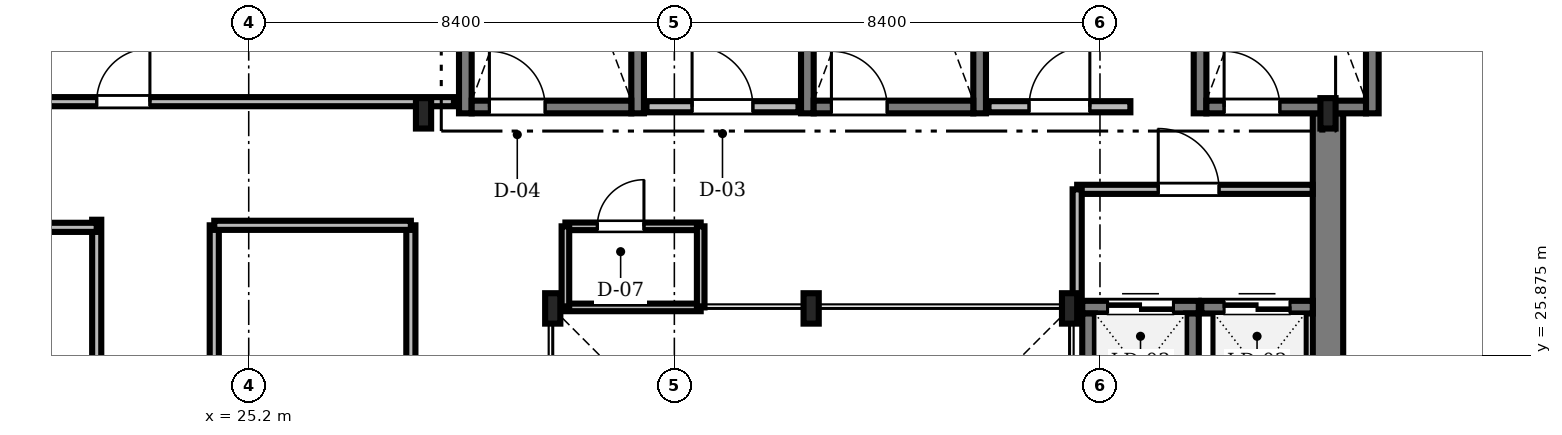
"""IFC4 building model, lengths in metres.
Left out: names, types, materials, properties, quantities, classifications, styles, units other than length and angle.
Written with IfcOpenShell. Run it as: python <this file> out.ifc"""

import sys

from ifc_helpers import new_model, si_unit, direction, frame, frame_2d, origin, origin_2d, place, context, subcontext, project, spatial, rectangle, i_section, extrude, source, transform, mapped, element, fill, save


model = new_model("IFC4")
c1 = context("Model", 3, precision=1e-05, world=origin(), true_north=direction((0.0, 1.0)))
c2 = subcontext(c1, "Body", "Model", "MODEL_VIEW")
j1 = project(units=[si_unit("LENGTHUNIT", "METRE"), si_unit("PLANEANGLEUNIT", "RADIAN")], contexts=[c1])
p1 = place(None, origin())
s1 = spatial("IfcSite", under=j1, at=p1, CompositionType="ELEMENT")
p2 = place(p1, origin())
s2 = spatial("IfcBuilding", under=s1, at=p2, CompositionType="ELEMENT")
p3 = place(p2, frame((0.0, 0.0, 250.6)))
s3 = spatial("IfcBuildingStorey", under=s2, at=p3, CompositionType="ELEMENT", Elevation=250.6)
m1 = source(origin(), c2, "Body", "SweptSolid", [
    extrude(rectangle(XDim=13.15, YDim=0.6, at=frame_2d((6.575, 0.0))), origin(), (0.0, 0.0, 1.0), 3.65),
])
p4 = place(p3, frame((46.5, 17.5, 0.0), z_axis=(0.0, 0.0, 1.0), x_axis=(0.0, 1.0, 0.0)))
e1 = element("IfcWall", 1, at=p4, inside=s3, PredefinedType="SHEAR", context=c2, shape_type="MappedRepresentation", body=[
    mapped(m1, transform((0.0, 0.0, 0.0), scale=1.0)),
])
m2 = source(origin(), c2, "Body", "SweptSolid", [
    extrude(i_section(OverallWidth=0.3, OverallDepth=0.6, WebThickness=0.015, FlangeThickness=0.03, FilletRadius=0.027, at=origin_2d()), origin(), (0.0, 0.0, 1.0), 3.65),
])
for number, where, z_axis, x_axis in (
    (2, (41.4, 26.8, 0.0), (0.0, 0.0, 1.0), (1.0, 0.0, 0.0)),
    (3, (36.3, 26.8, 0.0), (0.0, 0.0, 1.0), (1.0, 0.0, 0.0)),
    (4, (31.2, 26.8, 0.0), (0.0, 0.0, 1.0), (1.0, 0.0, 0.0)),
    (5, (28.65, 30.65, 0.0), (0.0, 0.0, 1.0), (1.0, 0.0, 0.0)),
    (6, (46.5, 30.65, 0.0), (0.0, 0.0, 1.0), (1.0, 0.0, 0.0)),
):
    element("IfcColumn", number, at=place(p3, frame(where, z_axis=z_axis, x_axis=x_axis)), inside=s3, PredefinedType="COLUMN", context=c2, shape_type="MappedRepresentation", body=[
        mapped(m2, transform((0.0, 0.0, 0.0), scale=1.0)),
    ])
m3 = source(origin(), c2, "Body", "SweptSolid", [
    extrude(rectangle(XDim=9.35, YDim=0.25, at=frame_2d((4.675, 0.0))), origin(), (0.0, 0.0, 1.0), 3.75),
])
for number, where, z_axis, x_axis in (
    (7, (29.475, 30.65, 0.0), (0.0, 0.0, 1.0), (0.0, 1.0, 0.0)),
    (8, (32.875, 30.65, 0.0), (0.0, 0.0, 1.0), (0.0, 1.0, 0.0)),
):
    element("IfcWall", number, at=place(p3, frame(where, z_axis=z_axis, x_axis=x_axis)), inside=s3, PredefinedType="SOLIDWALL", context=c2, shape_type="MappedRepresentation", body=[
        mapped(m3, transform((0.0, 0.0, 0.0), scale=1.0)),
    ])
m4 = source(origin(), c2, "Body", "SweptSolid", [
    extrude(rectangle(XDim=3.15, YDim=0.25, at=frame_2d((1.575, 0.0))), origin(), (0.0, 0.0, 1.0), 3.75),
])
p5 = place(p3, frame((29.6, 30.775, 0.0), z_axis=(0.0, 0.0, 1.0), x_axis=(1.0, 0.0, 0.0)))
e9 = element("IfcWall", 9, at=p5, inside=s3, PredefinedType="SOLIDWALL", context=c2, shape_type="MappedRepresentation", body=[
    mapped(m4, transform((0.0, 0.0, 0.0), scale=1.0)),
])
m5 = source(origin(), c2, "Body", "SweptSolid", [
    extrude(rectangle(XDim=1.1, YDim=2.2, at=frame_2d((0.55, 1.1))), frame((0.0, 0.135, 0.0), z_axis=(0.0, -1.0, 0.0), x_axis=(1.0, 0.0, 0.0)), (0.0, 0.0, 1.0), 0.27),
])
p6 = place(p5, frame((0.35, 0.0, 0.0)))
e10 = element("IfcOpeningElement", 10, at=p6, cuts=e9, PredefinedType="OPENING", context=c2, shape_type="MappedRepresentation", body=[
    mapped(m5, transform((0.0, 0.0, 0.0), scale=1.0)),
])
for number, where, z_axis, x_axis in (
    (11, (36.225, 30.65, 0.0), (0.0, 0.0, 1.0), (0.0, 1.0, 0.0)),
    (12, (39.625, 30.65, 0.0), (0.0, 0.0, 1.0), (0.0, 1.0, 0.0)),
):
    element("IfcWall", number, at=place(p3, frame(where, z_axis=z_axis, x_axis=x_axis)), inside=s3, PredefinedType="SOLIDWALL", context=c2, shape_type="MappedRepresentation", body=[
        mapped(m3, transform((0.0, 0.0, 0.0), scale=1.0)),
    ])
p7 = place(p3, frame((36.35, 30.775, 0.0), z_axis=(0.0, 0.0, 1.0), x_axis=(1.0, 0.0, 0.0)))
e13 = element("IfcWall", 13, at=p7, inside=s3, PredefinedType="SOLIDWALL", context=c2, shape_type="MappedRepresentation", body=[
    mapped(m4, transform((0.0, 0.0, 0.0), scale=1.0)),
])
p8 = place(p7, frame((0.35, 0.0, 0.0)))
e14 = element("IfcOpeningElement", 14, at=p8, cuts=e13, PredefinedType="OPENING", context=c2, shape_type="MappedRepresentation", body=[
    mapped(m5, transform((0.0, 0.0, 0.0), scale=1.0)),
])
for number, where, z_axis, x_axis in (
    (15, (43.975, 30.65, 0.0), (0.0, 0.0, 1.0), (0.0, 1.0, 0.0)),
    (16, (47.375, 30.65, 0.0), (0.0, 0.0, 1.0), (0.0, 1.0, 0.0)),
):
    element("IfcWall", number, at=place(p3, frame(where, z_axis=z_axis, x_axis=x_axis)), inside=s3, PredefinedType="SOLIDWALL", context=c2, shape_type="MappedRepresentation", body=[
        mapped(m3, transform((0.0, 0.0, 0.0), scale=1.0)),
    ])
p9 = place(p3, frame((44.1, 30.775, 0.0), z_axis=(0.0, 0.0, 1.0), x_axis=(1.0, 0.0, 0.0)))
e17 = element("IfcWall", 17, at=p9, inside=s3, PredefinedType="SOLIDWALL", context=c2, shape_type="MappedRepresentation", body=[
    mapped(m4, transform((0.0, 0.0, 0.0), scale=1.0)),
])
p10 = place(p9, frame((0.35, 0.0, 0.0)))
e18 = element("IfcOpeningElement", 18, at=p10, cuts=e17, PredefinedType="OPENING", context=c2, shape_type="MappedRepresentation", body=[
    mapped(m5, transform((0.0, 0.0, 0.0), scale=1.0)),
])
m6 = source(origin(), c2, "Body", "SweptSolid", [
    extrude(rectangle(XDim=3.0, YDim=0.22, at=frame_2d((1.5, 0.0))), origin(), (0.0, 0.0, 1.0), 3.65),
])
p11 = place(p3, frame((33.05, 30.78, 0.0), z_axis=(0.0, 0.0, 1.0), x_axis=(1.0, 0.0, 0.0)))
e19 = element("IfcWall", 19, at=p11, inside=s3, PredefinedType="SOLIDWALL", context=c2, shape_type="MappedRepresentation", body=[
    mapped(m6, transform((0.0, 0.0, 0.0), scale=1.0)),
])
m7 = source(origin(), c2, "Body", "SweptSolid", [
    extrude(rectangle(XDim=1.2, YDim=2.2, at=frame_2d((0.6, 1.1))), frame((0.0, 0.12, 0.0), z_axis=(0.0, -1.0, 0.0), x_axis=(1.0, 0.0, 0.0)), (0.0, 0.0, 1.0), 0.24),
])
p12 = place(p11, frame((0.9, 0.0, 0.0)))
e20 = element("IfcOpeningElement", 20, at=p12, cuts=e19, PredefinedType="OPENING", context=c2, shape_type="MappedRepresentation", body=[
    mapped(m7, transform((0.0, 0.0, 0.0), scale=1.0)),
])
m8 = source(origin(), c2, "Body", "SweptSolid", [
    extrude(rectangle(XDim=2.8, YDim=0.22, at=frame_2d((1.4, 0.0))), origin(), (0.0, 0.0, 1.0), 3.65),
])
p13 = place(p3, frame((39.8, 30.78, 0.0), z_axis=(0.0, 0.0, 1.0), x_axis=(1.0, 0.0, 0.0)))
e21 = element("IfcWall", 21, at=p13, inside=s3, PredefinedType="SOLIDWALL", context=c2, shape_type="MappedRepresentation", body=[
    mapped(m8, transform((0.0, 0.0, 0.0), scale=1.0)),
])
p14 = place(p13, frame((0.8, 0.0, 0.0)))
e22 = element("IfcOpeningElement", 22, at=p14, cuts=e21, PredefinedType="OPENING", context=c2, shape_type="MappedRepresentation", body=[
    mapped(m7, transform((0.0, 0.0, 0.0), scale=1.0)),
])
m9 = source(origin(), c2, "Body", "SweptSolid", [
    extrude(rectangle(XDim=2.3, YDim=0.25, at=frame_2d((1.15, 0.0))), origin(), (0.0, 0.0, 1.0), 3.65),
])
p15 = place(p3, frame((41.65, 26.825, 0.0), z_axis=(0.0, 0.0, 1.0), x_axis=(1.0, 0.0, 0.0)))
e23 = element("IfcWall", 23, at=p15, inside=s3, PredefinedType="SOLIDWALL", context=c2, shape_type="MappedRepresentation", body=[
    mapped(m9, transform((0.0, 0.0, 0.0), scale=1.0)),
])
m10 = source(origin(), c2, "Body", "SweptSolid", [
    extrude(rectangle(XDim=1.3, YDim=2.3, at=frame_2d((0.65, 1.15))), frame((0.0, 0.135, 0.0), z_axis=(0.0, -1.0, 0.0), x_axis=(1.0, 0.0, 0.0)), (0.0, 0.0, 1.0), 0.27),
])
p16 = place(p15, frame((0.5, 0.0, 0.0)))
e24 = element("IfcOpeningElement", 24, at=p16, cuts=e23, PredefinedType="OPENING", context=c2, shape_type="MappedRepresentation", body=[
    mapped(m10, transform((0.0, 0.0, 0.0), scale=1.0)),
])
for number, where, z_axis, x_axis in (
    (25, (41.775, 24.4, 0.0), (0.0, 0.0, 1.0), (0.0, 1.0, 0.0)),
    (26, (43.825, 24.4, 0.0), (0.0, 0.0, 1.0), (0.0, 1.0, 0.0)),
):
    element("IfcWall", number, at=place(p3, frame(where, z_axis=z_axis, x_axis=x_axis)), inside=s3, PredefinedType="SOLIDWALL", context=c2, shape_type="MappedRepresentation", body=[
        mapped(m9, transform((0.0, 0.0, 0.0), scale=1.0)),
    ])
m11 = source(origin(), c2, "Body", "SweptSolid", [
    extrude(rectangle(XDim=2.2, YDim=0.25, at=frame_2d((1.1, 0.0))), origin(), (0.0, 0.0, 1.0), 3.65),
])
p17 = place(p3, frame((44.0, 26.825, 0.0), z_axis=(0.0, 0.0, 1.0), x_axis=(1.0, 0.0, 0.0)))
e27 = element("IfcWall", 27, at=p17, inside=s3, PredefinedType="SOLIDWALL", context=c2, shape_type="MappedRepresentation", body=[
    mapped(m11, transform((0.0, 0.0, 0.0), scale=1.0)),
])
p18 = place(p17, frame((0.45, 0.0, 0.0)))
e28 = element("IfcOpeningElement", 28, at=p18, cuts=e27, PredefinedType="OPENING", context=c2, shape_type="MappedRepresentation", body=[
    mapped(m10, transform((0.0, 0.0, 0.0), scale=1.0)),
])
m12 = source(origin(), c2, "Body", "SweptSolid", [
    extrude(rectangle(XDim=13.328, YDim=0.18, at=frame_2d((6.664, 0.0))), origin(), (0.0, 0.0, 1.0), 2.892),
])
p19 = place(p3, frame((15.922, 30.88, 0.0), z_axis=(0.0, 0.0, 1.0), x_axis=(1.0, 0.0, 0.0)))
e29 = element("IfcWall", 29, at=p19, inside=s3, PredefinedType="PARTITIONING", context=c2, shape_type="MappedRepresentation", body=[
    mapped(m12, transform((0.0, 0.0, 0.0), scale=1.0)),
])
m13 = source(origin(), c2, "Body", "SweptSolid", [
    extrude(rectangle(XDim=1.05, YDim=2.2, at=frame_2d((0.525, 1.1))), frame((0.0, 0.1, 0.0), z_axis=(0.0, -1.0, 0.0), x_axis=(1.0, 0.0, 0.0)), (0.0, 0.0, 1.0), 0.2),
])
p20 = place(p19, frame((6.278, 0.0, 0.0)))
e30 = element("IfcOpeningElement", 30, at=p20, cuts=e29, PredefinedType="OPENING", context=c2, shape_type="MappedRepresentation", body=[
    mapped(m13, transform((0.0, 0.0, 0.0), scale=1.0)),
])
m14 = source(origin(), c2, "Body", "SweptSolid", [
    extrude(rectangle(XDim=6.54, YDim=0.18, at=frame_2d((3.27, 0.0))), origin(), (0.0, 0.0, 1.0), 3.092),
])
p21 = place(p3, frame((24.52, 21.9, 0.0), z_axis=(0.0, 0.0, 1.0), x_axis=(0.0, 1.0, 0.0)))
e31 = element("IfcWall", 31, at=p21, inside=s3, PredefinedType="PARTITIONING", context=c2, shape_type="MappedRepresentation", body=[
    mapped(m14, transform((0.0, 0.0, 0.0), scale=1.0)),
])
p22 = place(p21, frame((2.2, 0.0, 0.0)))
e32 = element("IfcOpeningElement", 32, at=p22, cuts=e31, PredefinedType="OPENING", context=c2, shape_type="MappedRepresentation", body=[
    mapped(m13, transform((0.0, 0.0, 0.0), scale=1.0)),
])
m15 = source(origin(), c2, "Body", "SweptSolid", [
    extrude(rectangle(XDim=4.648, YDim=0.18, at=frame_2d((2.324, 0.0))), origin(), (0.0, 0.0, 1.0), 3.282),
])
p23 = place(p3, frame((41.55, 29.15, 0.0), z_axis=(0.0, 0.0, 1.0), x_axis=(1.0, 0.0, 0.0)))
e33 = element("IfcWall", 33, at=p23, inside=s3, PredefinedType="PARTITIONING", context=c2, shape_type="MappedRepresentation", body=[
    mapped(m15, transform((0.0, 0.0, 0.0), scale=1.0)),
])
m16 = source(origin(), c2, "Body", "SweptSolid", [
    extrude(rectangle(XDim=1.2, YDim=2.2, at=frame_2d((0.6, 1.1))), frame((0.0, 0.1, 0.0), z_axis=(0.0, -1.0, 0.0), x_axis=(1.0, 0.0, 0.0)), (0.0, 0.0, 1.0), 0.2),
])
p24 = place(p23, frame((1.6, 0.0, 0.0)))
e34 = element("IfcOpeningElement", 34, at=p24, cuts=e33, PredefinedType="OPENING", context=c2, shape_type="MappedRepresentation", body=[
    mapped(m16, transform((0.0, 0.0, 0.0), scale=1.0)),
])
m17 = source(origin(), c2, "Body", "SweptSolid", [
    extrude(rectangle(XDim=2.67, YDim=0.15, at=frame_2d((1.335, 0.0))), origin(), (0.0, 0.0, 1.0), 3.282),
])
p25 = place(p3, frame((31.45, 28.42, 0.0), z_axis=(0.0, 0.0, 1.0), x_axis=(1.0, 0.0, 0.0)))
e35 = element("IfcWall", 35, at=p25, inside=s3, PredefinedType="PARTITIONING", context=c2, shape_type="MappedRepresentation", body=[
    mapped(m17, transform((0.0, 0.0, 0.0), scale=1.0)),
])
m18 = source(origin(), c2, "Body", "SweptSolid", [
    extrude(rectangle(XDim=0.92, YDim=2.1, at=frame_2d((0.46, 1.05))), frame((0.0, 0.085, 0.0), z_axis=(0.0, -1.0, 0.0), x_axis=(1.0, 0.0, 0.0)), (0.0, 0.0, 1.0), 0.17),
])
p26 = place(p25, frame((0.63, 0.0, 0.0)))
e36 = element("IfcOpeningElement", 36, at=p26, cuts=e35, PredefinedType="OPENING", context=c2, shape_type="MappedRepresentation", body=[
    mapped(m18, transform((0.0, 0.0, 0.0), scale=1.0)),
])
m19 = source(origin(), c2, "Body", "SweptSolid", [
    extrude(rectangle(XDim=15.04, YDim=0.18, at=frame_2d((7.52, 0.0))), origin(), (0.0, 0.0, 1.0), 3.092),
])
p27 = place(p3, frame((22.2, 13.51, 0.0), z_axis=(0.0, 0.0, 1.0), x_axis=(0.0, 1.0, 0.0)))
e37 = element("IfcWall", 37, at=p27, inside=s3, PredefinedType="PARTITIONING", context=c2, shape_type="MappedRepresentation", body=[
    mapped(m19, transform((0.0, 0.0, 0.0), scale=1.0)),
])
p28 = place(p3, frame((28.4, 21.9, 0.0), z_axis=(0.0, 0.0, 1.0), x_axis=(0.0, 1.0, 0.0)))
e38 = element("IfcWall", 38, at=p28, inside=s3, PredefinedType="PARTITIONING", context=c2, shape_type="MappedRepresentation", body=[
    mapped(m14, transform((0.0, 0.0, 0.0), scale=1.0)),
])
m20 = source(origin(), c2, "Body", "SweptSolid", [
    extrude(rectangle(XDim=6.47, YDim=0.18, at=frame_2d((3.235, 0.0))), origin(), (0.0, 0.0, 1.0), 2.892),
])
p29 = place(p3, frame((15.73, 28.4, 0.0), z_axis=(0.0, 0.0, 1.0), x_axis=(1.0, 0.0, 0.0)))
e39 = element("IfcWall", 39, at=p29, inside=s3, PredefinedType="PARTITIONING", context=c2, shape_type="MappedRepresentation", body=[
    mapped(m20, transform((0.0, 0.0, 0.0), scale=1.0)),
])
m21 = source(origin(), c2, "Body", "SweptSolid", [
    extrude(rectangle(XDim=3.88, YDim=0.18, at=frame_2d((1.94, 0.0))), origin(), (0.0, 0.0, 1.0), 3.65),
])
p30 = place(p3, frame((24.52, 28.44, 0.0), z_axis=(0.0, 0.0, 1.0), x_axis=(1.0, 0.0, 0.0)))
e40 = element("IfcWall", 40, at=p30, inside=s3, PredefinedType="PARTITIONING", context=c2, shape_type="MappedRepresentation", body=[
    mapped(m21, transform((0.0, 0.0, 0.0), scale=1.0)),
])
m22 = source(origin(), c2, "Body", "SweptSolid", [
    extrude(rectangle(XDim=2.67, YDim=0.15, at=frame_2d((1.335, 0.0))), origin(), (0.0, 0.0, 1.0), 3.192),
])
p31 = place(p3, frame((31.45, 26.82, 0.0), z_axis=(0.0, 0.0, 1.0), x_axis=(1.0, 0.0, 0.0)))
e41 = element("IfcWall", 41, at=p31, inside=s3, PredefinedType="PARTITIONING", context=c2, shape_type="MappedRepresentation", body=[
    mapped(m22, transform((0.0, 0.0, 0.0), scale=1.0)),
])
m23 = source(origin(), c2, "Body", "SweptSolid", [
    extrude(rectangle(XDim=2.35, YDim=0.18, at=frame_2d((1.175, 0.0))), origin(), (0.0, 0.0, 1.0), 3.282),
])
p32 = place(p3, frame((41.55, 26.8, 0.0), z_axis=(0.0, 0.0, 1.0), x_axis=(0.0, 1.0, 0.0)))
e42 = element("IfcWall", 42, at=p32, inside=s3, PredefinedType="PARTITIONING", context=c2, shape_type="MappedRepresentation", body=[
    mapped(m23, transform((0.0, 0.0, 0.0), scale=1.0)),
])
m24 = source(origin(), c2, "Body", "SweptSolid", [
    extrude(rectangle(XDim=1.6, YDim=0.15, at=frame_2d((0.8, 0.0))), origin(), (0.0, 0.0, 1.0), 3.192),
])
for number, where, z_axis, x_axis in (
    (43, (31.45, 26.82, 0.0), (0.0, 0.0, 1.0), (0.0, 1.0, 0.0)),
    (44, (34.12, 26.82, 0.0), (0.0, 0.0, 1.0), (0.0, 1.0, 0.0)),
):
    element("IfcWall", number, at=place(p3, frame(where, z_axis=z_axis, x_axis=x_axis)), inside=s3, PredefinedType="PARTITIONING", context=c2, shape_type="MappedRepresentation", body=[
        mapped(m24, transform((0.0, 0.0, 0.0), scale=1.0)),
    ])
m25 = source(origin(), c2, "Body", "SweptSolid", [
    extrude(rectangle(XDim=1.1, YDim=2.2, at=frame_2d((0.55, 1.1))), frame((0.0, 0.025, 0.0), z_axis=(0.0, -1.0, 0.0), x_axis=(1.0, 0.0, 0.0)), (0.0, 0.0, 1.0), 0.05),
])
p33 = place(p6, origin())
e45 = element("IfcDoor", 45, at=p33, inside=s3, OperationType="SINGLE_SWING_LEFT", PredefinedType="DOOR", context=c2, shape_type="MappedRepresentation", body=[
    mapped(m25, transform((0.0, 0.0, 0.0), scale=1.0)),
])
fill(e10, e45)
p34 = place(p8, origin())
e46 = element("IfcDoor", 46, at=p34, inside=s3, OperationType="SINGLE_SWING_LEFT", PredefinedType="DOOR", context=c2, shape_type="MappedRepresentation", body=[
    mapped(m25, transform((0.0, 0.0, 0.0), scale=1.0)),
])
fill(e14, e46)
p35 = place(p10, origin())
e47 = element("IfcDoor", 47, at=p35, inside=s3, OperationType="SINGLE_SWING_LEFT", PredefinedType="DOOR", context=c2, shape_type="MappedRepresentation", body=[
    mapped(m25, transform((0.0, 0.0, 0.0), scale=1.0)),
])
fill(e18, e47)
m26 = source(origin(), c2, "Body", "SweptSolid", [
    extrude(rectangle(XDim=1.2, YDim=2.2, at=frame_2d((0.6, 1.1))), frame((0.0, 0.025, 0.0), z_axis=(0.0, -1.0, 0.0), x_axis=(1.0, 0.0, 0.0)), (0.0, 0.0, 1.0), 0.05),
])
p36 = place(p12, origin())
e48 = element("IfcDoor", 48, at=p36, inside=s3, OperationType="SINGLE_SWING_LEFT", PredefinedType="DOOR", context=c2, shape_type="MappedRepresentation", body=[
    mapped(m26, transform((0.0, 0.0, 0.0), scale=1.0)),
])
fill(e20, e48)
p37 = place(p14, origin())
e49 = element("IfcDoor", 49, at=p37, inside=s3, OperationType="SINGLE_SWING_RIGHT", PredefinedType="DOOR", context=c2, shape_type="MappedRepresentation", body=[
    mapped(m26, transform((0.0, 0.0, 0.0), scale=1.0)),
])
fill(e22, e49)
m27 = source(origin(), c2, "Body", "SweptSolid", [
    extrude(rectangle(XDim=1.3, YDim=2.3, at=frame_2d((0.65, 1.15))), frame((0.0, 0.025, 0.0), z_axis=(0.0, -1.0, 0.0), x_axis=(1.0, 0.0, 0.0)), (0.0, 0.0, 1.0), 0.05),
])
p38 = place(p16, origin())
e50 = element("IfcDoor", 50, at=p38, inside=s3, OperationType="DOUBLE_DOOR_SLIDING", PredefinedType="DOOR", context=c2, shape_type="MappedRepresentation", body=[
    mapped(m27, transform((0.0, 0.0, 0.0), scale=1.0)),
])
fill(e24, e50)
p39 = place(p18, origin())
e51 = element("IfcDoor", 51, at=p39, inside=s3, OperationType="DOUBLE_DOOR_SLIDING", PredefinedType="DOOR", context=c2, shape_type="MappedRepresentation", body=[
    mapped(m27, transform((0.0, 0.0, 0.0), scale=1.0)),
])
fill(e28, e51)
m28 = source(origin(), c2, "Body", "SweptSolid", [
    extrude(rectangle(XDim=1.05, YDim=2.2, at=frame_2d((0.525, 1.1))), frame((0.0, 0.025, 0.0), z_axis=(0.0, -1.0, 0.0), x_axis=(1.0, 0.0, 0.0)), (0.0, 0.0, 1.0), 0.05),
])
p40 = place(p20, origin())
e52 = element("IfcDoor", 52, at=p40, inside=s3, OperationType="SINGLE_SWING_RIGHT", PredefinedType="DOOR", context=c2, shape_type="MappedRepresentation", body=[
    mapped(m28, transform((0.0, 0.0, 0.0), scale=1.0)),
])
fill(e30, e52)
p41 = place(p24, origin())
e53 = element("IfcDoor", 53, at=p41, inside=s3, OperationType="SINGLE_SWING_LEFT", PredefinedType="DOOR", context=c2, shape_type="MappedRepresentation", body=[
    mapped(m26, transform((0.0, 0.0, 0.0), scale=1.0)),
])
fill(e34, e53)
m29 = source(origin(), c2, "Body", "SweptSolid", [
    extrude(rectangle(XDim=0.92, YDim=2.1, at=frame_2d((0.46, 1.05))), frame((0.0, 0.025, 0.0), z_axis=(0.0, -1.0, 0.0), x_axis=(1.0, 0.0, 0.0)), (0.0, 0.0, 1.0), 0.05),
])
p42 = place(p26, origin())
e54 = element("IfcDoor", 54, at=p42, inside=s3, OperationType="SINGLE_SWING_RIGHT", PredefinedType="DOOR", context=c2, shape_type="MappedRepresentation", body=[
    mapped(m29, transform((0.0, 0.0, 0.0), scale=1.0)),
])
fill(e36, e54)
save(model, sys.argv[1])
